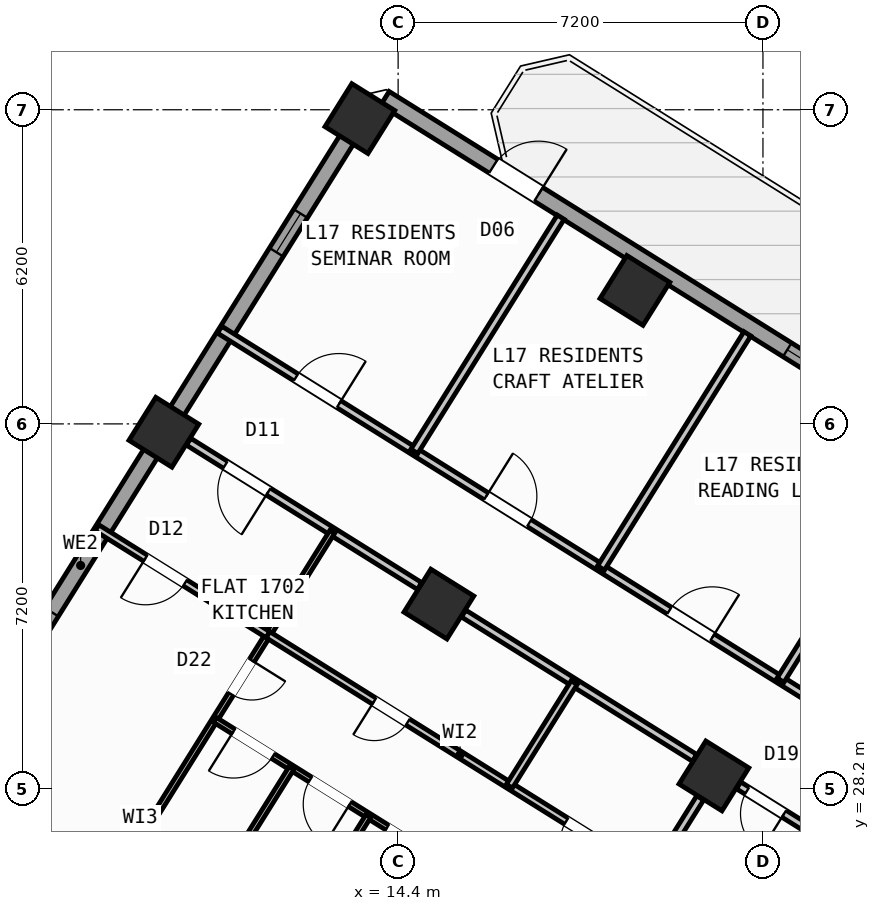
"""IFC4 building model, lengths in metres.
Left out: names, types, materials, properties, quantities, classifications, styles, units other than length and angle.
Written with IfcOpenShell. Run it as: python <this file> out.ifc"""

import sys

from ifc_helpers import new_model, si_unit, direction, frame, frame_2d, origin, origin_2d, place, context, subcontext, project, spatial, rectangle, hollow_rectangle, extrude, source, transform, mapped, element, fill, save


model = new_model("IFC4")
c1 = context("Model", 3, precision=1e-05, world=origin(), true_north=direction((0.0, 1.0)))
c2 = subcontext(c1, "Body", "Model", "MODEL_VIEW")
j1 = project(units=[si_unit("LENGTHUNIT", "METRE"), si_unit("PLANEANGLEUNIT", "RADIAN")], contexts=[c1])
p1 = place(None, origin())
s1 = spatial("IfcSite", under=j1, at=p1, CompositionType="ELEMENT")
p2 = place(p1, origin())
s2 = spatial("IfcBuilding", under=s1, at=p2, CompositionType="ELEMENT")
p3 = place(p2, frame((0.0, 0.0, 67.2)))
s3 = spatial("IfcBuildingStorey", under=s2, at=p3, CompositionType="ELEMENT", Elevation=67.2)
m1 = source(origin(), c2, "Body", "SweptSolid", [
    extrude(hollow_rectangle(XDim=1.0, YDim=1.0, WallThickness=0.04, at=origin_2d()), origin(), (0.0, 0.0, 1.0), 4.5),
])
for number, where, z_axis, x_axis in (
    (1, (20.632, 28.452, 0.0), (0.0, 0.0, 1.0), (-0.848, 0.53, 0.0)),
    (2, (19.073, 38.034, 0.0), (0.0, 0.0, 1.0), (-0.848, 0.53, 0.0)),
    (3, (15.205, 31.844, 0.0), (0.0, 0.0, 1.0), (-0.848, 0.53, 0.0)),
    (4, (13.646, 41.426, 0.0), (0.0, 0.0, 1.0), (-0.848, 0.53, 0.0)),
    (5, (9.777, 35.235, 0.0), (0.0, 0.0, 1.0), (-0.848, 0.53, 0.0)),
):
    element("IfcColumn", number, at=place(p3, frame(where, z_axis=z_axis, x_axis=x_axis)), inside=s3, PredefinedType="COLUMN", context=c2, shape_type="MappedRepresentation", body=[
        mapped(m1, transform((0.0, 0.0, 0.0), scale=1.0)),
    ])
p4 = place(p3, frame((2.415, 23.452, 0.0), z_axis=(0.0, 0.0, 1.0), x_axis=(0.52991049553, 0.848053575387, 0.0)))
e6 = element("IfcWall", 6, at=p4, inside=s3, PredefinedType="STANDARD", context=c2, shape_type="SweptSolid", body=[
    extrude(rectangle(XDim=21.587, YDim=0.32, at=frame_2d((10.794, 0.0))), origin(), (0.0, 0.0, 1.0), 2.395),
])
p5 = place(p4, frame((1.788, 0.0, 1.0)))
e7 = element("IfcOpeningElement", 7, at=p5, cuts=e6, PredefinedType="OPENING", context=c2, shape_type="SweptSolid", body=[
    extrude(rectangle(XDim=0.9, YDim=1.25, at=frame_2d((0.45, 0.625))), frame((0.0, 0.17, 0.0), z_axis=(0.0, -1.0, 0.0), x_axis=(1.0, 0.0, 0.0)), (0.0, 0.0, 1.0), 0.34),
])
p6 = place(p4, frame((4.125, 0.0, 1.0)))
e8 = element("IfcOpeningElement", 8, at=p6, cuts=e6, PredefinedType="OPENING", context=c2, shape_type="SweptSolid", body=[
    extrude(rectangle(XDim=0.9, YDim=1.25, at=frame_2d((0.45, 0.625))), frame((0.0, 0.17, 0.0), z_axis=(0.0, -1.0, 0.0), x_axis=(1.0, 0.0, 0.0)), (0.0, 0.0, 1.0), 0.34),
])
p7 = place(p4, frame((8.809, 0.0, 1.0)))
e9 = element("IfcOpeningElement", 9, at=p7, cuts=e6, PredefinedType="OPENING", context=c2, shape_type="SweptSolid", body=[
    extrude(rectangle(XDim=0.9, YDim=1.25, at=frame_2d((0.45, 0.625))), frame((0.0, 0.17, 0.0), z_axis=(0.0, -1.0, 0.0), x_axis=(1.0, 0.0, 0.0)), (0.0, 0.0, 1.0), 0.34),
])
p8 = place(p4, frame((18.084, 0.0, 1.0)))
e10 = element("IfcOpeningElement", 10, at=p8, cuts=e6, PredefinedType="OPENING", context=c2, shape_type="SweptSolid", body=[
    extrude(rectangle(XDim=0.9, YDim=1.25, at=frame_2d((0.45, 0.625))), frame((0.0, 0.17, 0.0), z_axis=(0.0, -1.0, 0.0), x_axis=(1.0, 0.0, 0.0)), (0.0, 0.0, 1.0), 0.34),
])
p9 = place(p3, frame((14.138, 41.825, 0.0), z_axis=(0.0, 0.0, 1.0), x_axis=(0.848046498049, -0.529921821731, 0.0)))
e11 = element("IfcWall", 11, at=p9, inside=s3, PredefinedType="STANDARD", context=c2, shape_type="SweptSolid", body=[
    extrude(rectangle(XDim=31.588, YDim=0.32, at=frame_2d((15.794, 0.0))), origin(), (0.0, 0.0, 1.0), 4.22),
])
p10 = place(p9, frame((2.526, 0.0, 0.0)))
e12 = element("IfcOpeningElement", 12, at=p10, cuts=e11, PredefinedType="OPENING", context=c2, shape_type="SweptSolid", body=[
    extrude(rectangle(XDim=1.05, YDim=2.15, at=frame_2d((0.525, 1.075))), frame((0.0, 0.17, 0.0), z_axis=(0.0, -1.0, 0.0), x_axis=(1.0, 0.0, 0.0)), (0.0, 0.0, 1.0), 0.34),
])
p11 = place(p9, frame((9.364, 0.0, 0.95)))
e13 = element("IfcOpeningElement", 13, at=p11, cuts=e11, PredefinedType="OPENING", context=c2, shape_type="SweptSolid", body=[
    extrude(rectangle(XDim=1.2, YDim=1.4, at=frame_2d((0.6, 0.7))), frame((0.0, 0.17, 0.0), z_axis=(0.0, -1.0, 0.0), x_axis=(1.0, 0.0, 0.0)), (0.0, 0.0, 1.0), 0.34),
])
p12 = place(p9, frame((14.636, 0.0, 1.0)))
e14 = element("IfcOpeningElement", 14, at=p12, cuts=e11, PredefinedType="OPENING", context=c2, shape_type="SweptSolid", body=[
    extrude(rectangle(XDim=0.9, YDim=1.25, at=frame_2d((0.45, 0.625))), frame((0.0, 0.17, 0.0), z_axis=(0.0, -1.0, 0.0), x_axis=(1.0, 0.0, 0.0)), (0.0, 0.0, 1.0), 0.34),
])
p13 = place(p9, frame((22.306, 0.0, 0.85)))
e15 = element("IfcOpeningElement", 15, at=p13, cuts=e11, PredefinedType="OPENING", context=c2, shape_type="SweptSolid", body=[
    extrude(rectangle(XDim=1.5, YDim=1.5, at=frame_2d((0.75, 0.75))), frame((0.0, 0.17, 0.0), z_axis=(0.0, -1.0, 0.0), x_axis=(1.0, 0.0, 0.0)), (0.0, 0.0, 1.0), 0.34),
])
p14 = place(p9, frame((26.981, 0.0, 0.85)))
e16 = element("IfcOpeningElement", 16, at=p14, cuts=e11, PredefinedType="OPENING", context=c2, shape_type="SweptSolid", body=[
    extrude(rectangle(XDim=1.5, YDim=1.5, at=frame_2d((0.75, 0.75))), frame((0.0, 0.17, 0.0), z_axis=(0.0, -1.0, 0.0), x_axis=(1.0, 0.0, 0.0)), (0.0, 0.0, 1.0), 0.34),
])
p15 = place(p3, frame((25.065, 28.394, 0.0), z_axis=(0.0, 0.0, 1.0), x_axis=(-0.848048310262, 0.529918921593, 0.0)))
e17 = element("IfcWall", 17, at=p15, inside=s3, PredefinedType="PARTITIONING", context=c2, shape_type="SweptSolid", body=[
    extrude(rectangle(XDim=16.73, YDim=0.16, at=frame_2d((8.365, 0.0))), origin(), (0.0, 0.0, 1.0), 4.21),
])
p16 = place(p15, frame((1.338, 0.0, 0.0)))
e18 = element("IfcOpeningElement", 18, at=p16, cuts=e17, PredefinedType="OPENING", context=c2, shape_type="SweptSolid", body=[
    extrude(rectangle(XDim=1.0, YDim=2.1, at=frame_2d((0.5, 1.05))), frame((0.0, 0.09, 0.0), z_axis=(0.0, -1.0, 0.0), x_axis=(1.0, 0.0, 0.0)), (0.0, 0.0, 1.0), 0.18),
])
p17 = place(p15, frame((5.265, 0.0, 0.0)))
e19 = element("IfcOpeningElement", 19, at=p17, cuts=e17, PredefinedType="OPENING", context=c2, shape_type="SweptSolid", body=[
    extrude(rectangle(XDim=1.0, YDim=2.1, at=frame_2d((0.5, 1.05))), frame((0.0, 0.09, 0.0), z_axis=(0.0, -1.0, 0.0), x_axis=(1.0, 0.0, 0.0)), (0.0, 0.0, 1.0), 0.18),
])
p18 = place(p15, frame((9.526, 0.0, 0.0)))
e20 = element("IfcOpeningElement", 20, at=p18, cuts=e17, PredefinedType="OPENING", context=c2, shape_type="SweptSolid", body=[
    extrude(rectangle(XDim=1.0, YDim=2.1, at=frame_2d((0.5, 1.05))), frame((0.0, 0.09, 0.0), z_axis=(0.0, -1.0, 0.0), x_axis=(1.0, 0.0, 0.0)), (0.0, 0.0, 1.0), 0.18),
])
p19 = place(p15, frame((13.954, 0.0, 0.0)))
e21 = element("IfcOpeningElement", 21, at=p19, cuts=e17, PredefinedType="OPENING", context=c2, shape_type="SweptSolid", body=[
    extrude(rectangle(XDim=1.0, YDim=2.1, at=frame_2d((0.5, 1.05))), frame((0.0, 0.09, 0.0), z_axis=(0.0, -1.0, 0.0), x_axis=(1.0, 0.0, 0.0)), (0.0, 0.0, 1.0), 0.18),
])
p20 = place(p3, frame((23.899, 26.529, 0.0), z_axis=(0.0, 0.0, 1.0), x_axis=(-0.848061058944, 0.529898518871, 0.0)))
e22 = element("IfcWall", 22, at=p20, inside=s3, PredefinedType="PARTITIONING", context=c2, shape_type="SweptSolid", body=[
    extrude(rectangle(XDim=3.278, YDim=0.16, at=frame_2d((1.639, 0.0))), origin(), (0.0, 0.0, 1.0), 3.595),
])
p21 = place(p20, frame((2.22, 0.0, 0.0)))
e23 = element("IfcOpeningElement", 23, at=p21, cuts=e22, PredefinedType="OPENING", context=c2, shape_type="SweptSolid", body=[
    extrude(rectangle(XDim=0.86, YDim=2.05, at=frame_2d((0.43, 1.025))), frame((0.0, 0.09, 0.0), z_axis=(0.0, -1.0, 0.0), x_axis=(1.0, 0.0, 0.0)), (0.0, 0.0, 1.0), 0.18),
])
p22 = place(p3, frame((20.251, 28.808, 0.0), z_axis=(0.0, 0.0, 1.0), x_axis=(-0.848044224181, 0.529925460639, 0.0)))
e24 = element("IfcWall", 24, at=p22, inside=s3, PredefinedType="PARTITIONING", context=c2, shape_type="SweptSolid", body=[
    extrude(rectangle(XDim=5.376, YDim=0.16, at=frame_2d((2.688, 0.0))), origin(), (0.0, 0.0, 1.0), 3.595),
])
p23 = place(p3, frame((14.823, 32.2, 0.0), z_axis=(0.0, 0.0, 1.0), x_axis=(-0.848044224181, 0.529925460639, 0.0)))
e25 = element("IfcWall", 25, at=p23, inside=s3, PredefinedType="PARTITIONING", context=c2, shape_type="SweptSolid", body=[
    extrude(rectangle(XDim=5.376, YDim=0.16, at=frame_2d((2.688, 0.0))), origin(), (0.0, 0.0, 1.0), 3.595),
])
p24 = place(p23, frame((3.518, 0.0, 0.0)))
e26 = element("IfcOpeningElement", 26, at=p24, cuts=e25, PredefinedType="OPENING", context=c2, shape_type="SweptSolid", body=[
    extrude(rectangle(XDim=1.0, YDim=2.1, at=frame_2d((0.5, 1.05))), frame((0.0, 0.09, 0.0), z_axis=(0.0, -1.0, 0.0), x_axis=(1.0, 0.0, 0.0)), (0.0, 0.0, 1.0), 0.18),
])
p25 = place(p3, frame((20.361, 28.018, 0.0), z_axis=(0.0, 0.0, 1.0), x_axis=(-0.529915015264, -0.848050751193, 0.0)))
e27 = element("IfcWall", 27, at=p25, inside=s3, PredefinedType="PARTITIONING", context=c2, shape_type="SweptSolid", body=[
    extrude(rectangle(XDim=6.276, YDim=0.16, at=frame_2d((3.138, 0.0))), origin(), (0.0, 0.0, 1.0), 2.395),
])
p26 = place(p3, frame((22.585, 27.35, 0.0), z_axis=(0.0, 0.0, 1.0), x_axis=(-0.529977067289, -0.848011974059, 0.0)))
e28 = element("IfcWall", 28, at=p26, inside=s3, PredefinedType="PLUMBINGWALL", context=c2, shape_type="SweptSolid", body=[
    extrude(rectangle(XDim=3.01, YDim=0.14, at=frame_2d((1.505, 0.0))), origin(), (0.0, 0.0, 1.0), 3.865),
])
p27 = place(p26, frame((1.115, 0.0, 0.0)))
e29 = element("IfcOpeningElement", 29, at=p27, cuts=e28, PredefinedType="OPENING", context=c2, shape_type="SweptSolid", body=[
    extrude(rectangle(XDim=0.78, YDim=2.05, at=frame_2d((0.39, 1.025))), frame((0.0, 0.08, 0.0), z_axis=(0.0, -1.0, 0.0), x_axis=(1.0, 0.0, 0.0)), (0.0, 0.0, 1.0), 0.16),
])
p28 = place(p3, frame((13.104, 33.274, 0.0), z_axis=(0.0, 0.0, 1.0), x_axis=(-0.529916182913, -0.848050021571, 0.0)))
e30 = element("IfcWall", 30, at=p28, inside=s3, PredefinedType="PARTITIONING", context=c2, shape_type="SweptSolid", body=[
    extrude(rectangle(XDim=14.32, YDim=0.11, at=frame_2d((7.16, 0.0))), origin(), (0.0, 0.0, 1.0), 4.21),
])
p29 = place(p28, frame((3.0, 0.0, 0.0)))
e31 = element("IfcOpeningElement", 31, at=p29, cuts=e30, PredefinedType="OPENING", context=c2, shape_type="SweptSolid", body=[
    extrude(rectangle(XDim=0.78, YDim=2.05, at=frame_2d((0.39, 1.025))), frame((0.0, 0.065, 0.0), z_axis=(0.0, -1.0, 0.0), x_axis=(1.0, 0.0, 0.0)), (0.0, 0.0, 1.0), 0.13),
])
p30 = place(p3, frame((11.832, 31.239, 0.0), z_axis=(0.0, 0.0, 1.0), x_axis=(-0.848025873403, 0.529954826413, 0.0)))
e32 = element("IfcWall", 32, at=p30, inside=s3, PredefinedType="PLUMBINGWALL", context=c2, shape_type="SweptSolid", body=[
    extrude(rectangle(XDim=3.98, YDim=0.14, at=frame_2d((1.99, 0.0))), origin(), (0.0, 0.0, 1.0), 4.21),
])
p31 = place(p30, frame((1.93, 0.0, 0.0)))
e33 = element("IfcOpeningElement", 33, at=p31, cuts=e32, PredefinedType="OPENING", context=c2, shape_type="SweptSolid", body=[
    extrude(rectangle(XDim=0.92, YDim=2.08, at=frame_2d((0.46, 1.04))), frame((0.0, 0.08, 0.0), z_axis=(0.0, -1.0, 0.0), x_axis=(1.0, 0.0, 0.0)), (0.0, 0.0, 1.0), 0.16),
])
p32 = place(p3, frame((19.413, 26.501, 0.0), z_axis=(0.0, 0.0, 1.0), x_axis=(-0.848051995289, 0.529913024266, 0.0)))
e34 = element("IfcWall", 34, at=p32, inside=s3, PredefinedType="PLUMBINGWALL", context=c2, shape_type="SweptSolid", body=[
    extrude(rectangle(XDim=8.94, YDim=0.14, at=frame_2d((4.47, 0.0))), origin(), (0.0, 0.0, 1.0), 4.21),
])
p33 = place(p32, frame((5.688, 0.0, 0.0)))
e35 = element("IfcOpeningElement", 35, at=p33, cuts=e34, PredefinedType="OPENING", context=c2, shape_type="SweptSolid", body=[
    extrude(rectangle(XDim=0.78, YDim=2.05, at=frame_2d((0.39, 1.025))), frame((0.0, 0.08, 0.0), z_axis=(0.0, -1.0, 0.0), x_axis=(1.0, 0.0, 0.0)), (0.0, 0.0, 1.0), 0.16),
])
p34 = place(p32, frame((1.218, 0.0, 0.0)))
e36 = element("IfcOpeningElement", 36, at=p34, cuts=e34, PredefinedType="OPENING", context=c2, shape_type="SweptSolid", body=[
    extrude(rectangle(XDim=0.78, YDim=2.05, at=frame_2d((0.39, 1.025))), frame((0.0, 0.08, 0.0), z_axis=(0.0, -1.0, 0.0), x_axis=(1.0, 0.0, 0.0)), (0.0, 0.0, 1.0), 0.16),
])
p35 = place(p3, frame((17.874, 30.294, 0.0), z_axis=(0.0, 0.0, 1.0), x_axis=(-0.52988967038, -0.848066587731, 0.0)))
e37 = element("IfcWall", 37, at=p35, inside=s3, PredefinedType="PLUMBINGWALL", context=c2, shape_type="SweptSolid", body=[
    extrude(rectangle(XDim=2.41, YDim=0.14, at=frame_2d((1.205, 0.0))), origin(), (0.0, 0.0, 1.0), 4.21),
])
p36 = place(p3, frame((18.364, 24.823, 0.0), z_axis=(0.0, 0.0, 1.0), x_axis=(-0.848056599187, 0.529905656296, 0.0)))
e38 = element("IfcWall", 38, at=p36, inside=s3, PredefinedType="PARTITIONING", context=c2, shape_type="SweptSolid", body=[
    extrude(rectangle(XDim=8.94, YDim=0.11, at=frame_2d((4.47, 0.0))), origin(), (0.0, 0.0, 1.0), 4.21),
])
p37 = place(p36, frame((0.434, 0.0, 0.0)))
e39 = element("IfcOpeningElement", 39, at=p37, cuts=e38, PredefinedType="OPENING", context=c2, shape_type="SweptSolid", body=[
    extrude(rectangle(XDim=0.92, YDim=2.08, at=frame_2d((0.46, 1.04))), frame((0.0, 0.065, 0.0), z_axis=(0.0, -1.0, 0.0), x_axis=(1.0, 0.0, 0.0)), (0.0, 0.0, 1.0), 0.13),
])
p38 = place(p36, frame((2.222, 0.0, 0.0)))
e40 = element("IfcOpeningElement", 40, at=p38, cuts=e38, PredefinedType="OPENING", context=c2, shape_type="SweptSolid", body=[
    extrude(rectangle(XDim=0.92, YDim=2.08, at=frame_2d((0.46, 1.04))), frame((0.0, 0.065, 0.0), z_axis=(0.0, -1.0, 0.0), x_axis=(1.0, 0.0, 0.0)), (0.0, 0.0, 1.0), 0.13),
])
p39 = place(p36, frame((4.01, 0.0, 0.0)))
e41 = element("IfcOpeningElement", 41, at=p39, cuts=e38, PredefinedType="OPENING", context=c2, shape_type="SweptSolid", body=[
    extrude(rectangle(XDim=0.92, YDim=2.08, at=frame_2d((0.46, 1.04))), frame((0.0, 0.065, 0.0), z_axis=(0.0, -1.0, 0.0), x_axis=(1.0, 0.0, 0.0)), (0.0, 0.0, 1.0), 0.13),
])
p40 = place(p36, frame((5.798, 0.0, 0.0)))
e42 = element("IfcOpeningElement", 42, at=p40, cuts=e38, PredefinedType="OPENING", context=c2, shape_type="SweptSolid", body=[
    extrude(rectangle(XDim=0.92, YDim=2.08, at=frame_2d((0.46, 1.04))), frame((0.0, 0.065, 0.0), z_axis=(0.0, -1.0, 0.0), x_axis=(1.0, 0.0, 0.0)), (0.0, 0.0, 1.0), 0.13),
])
p41 = place(p36, frame((7.586, 0.0, 0.0)))
e43 = element("IfcOpeningElement", 43, at=p41, cuts=e38, PredefinedType="OPENING", context=c2, shape_type="SweptSolid", body=[
    extrude(rectangle(XDim=0.92, YDim=2.08, at=frame_2d((0.46, 1.04))), frame((0.0, 0.065, 0.0), z_axis=(0.0, -1.0, 0.0), x_axis=(1.0, 0.0, 0.0)), (0.0, 0.0, 1.0), 0.13),
])
p42 = place(p3, frame((13.815, 27.665, 0.0), z_axis=(0.0, 0.0, 1.0), x_axis=(-0.529910626741, -0.8480534934, 0.0)))
e44 = element("IfcWall", 44, at=p42, inside=s3, PredefinedType="PARTITIONING", context=c2, shape_type="SweptSolid", body=[
    extrude(rectangle(XDim=9.94, YDim=0.11, at=frame_2d((4.97, 0.0))), origin(), (0.0, 0.0, 1.0), 4.21),
])
p43 = place(p3, frame((12.299, 28.613, 0.0), z_axis=(0.0, 0.0, 1.0), x_axis=(-0.529928290772, -0.848042455682, 0.0)))
e45 = element("IfcWall", 45, at=p43, inside=s3, PredefinedType="PARTITIONING", context=c2, shape_type="SweptSolid", body=[
    extrude(rectangle(XDim=9.94, YDim=0.11, at=frame_2d((4.97, 0.0))), origin(), (0.0, 0.0, 1.0), 4.21),
])
p44 = place(p3, frame((24.326, 34.148, 0.0), z_axis=(0.0, 0.0, 1.0), x_axis=(-0.529915808518, -0.848050255517, 0.0)))
e46 = element("IfcWall", 46, at=p44, inside=s3, PredefinedType="PARTITIONING", context=c2, shape_type="SweptSolid", body=[
    extrude(rectangle(XDim=4.488, YDim=0.16, at=frame_2d((2.244, 0.0))), origin(), (0.0, 0.0, 1.0), 2.395),
])
for number, where, z_axis, x_axis in (
    (47, (21.292, 37.178, 0.0), (0.0, 0.0, 1.0), (-0.53, -0.848, 0.0)),
    (48, (17.608, 39.48, 0.0), (0.0, 0.0, 1.0), (-0.53, -0.848, 0.0)),
):
    element("IfcWall", number, at=place(p3, frame(where, z_axis=z_axis, x_axis=x_axis)), inside=s3, PredefinedType="PARTITIONING", context=c2, shape_type="SweptSolid", body=[
        extrude(rectangle(XDim=5.45, YDim=0.16, at=frame_2d((2.725, 0.0))), origin(), (0.0, 0.0, 1.0), 3.865),
    ])
m2 = source(origin(), c2, "Body", "SweptSolid", [
    extrude(rectangle(XDim=1.05, YDim=2.15, at=frame_2d((0.525, 1.075))), frame((0.0, 0.025, 0.0), z_axis=(0.0, -1.0, 0.0), x_axis=(1.0, 0.0, 0.0)), (0.0, 0.0, 1.0), 0.05),
])
p45 = place(p10, origin())
e49 = element("IfcDoor", 49, at=p45, inside=s3, OperationType="SINGLE_SWING_RIGHT", PredefinedType="DOOR", context=c2, shape_type="MappedRepresentation", body=[
    mapped(m2, transform((0.0, 0.0, 0.0), scale=1.0)),
])
fill(e12, e49)
m3 = source(origin(), c2, "Body", "SweptSolid", [
    extrude(rectangle(XDim=0.9, YDim=1.25, at=frame_2d((0.45, 0.625))), frame((0.0, 0.03, 0.0), z_axis=(0.0, -1.0, 0.0), x_axis=(1.0, 0.0, 0.0)), (0.0, 0.0, 1.0), 0.06),
])
p46 = place(p7, origin())
e50 = element("IfcWindow", 50, at=p46, inside=s3, PartitioningType="SINGLE_PANEL", PredefinedType="WINDOW", context=c2, shape_type="MappedRepresentation", body=[
    mapped(m3, transform((0.0, 0.0, 0.0), scale=1.0)),
])
fill(e9, e50)
p47 = place(p8, origin())
e51 = element("IfcWindow", 51, at=p47, inside=s3, PartitioningType="SINGLE_PANEL", PredefinedType="WINDOW", context=c2, shape_type="MappedRepresentation", body=[
    mapped(m3, transform((0.0, 0.0, 0.0), scale=1.0)),
])
fill(e10, e51)
m4 = source(origin(), c2, "Body", "SweptSolid", [
    extrude(rectangle(XDim=1.2, YDim=1.4, at=frame_2d((0.6, 0.7))), frame((0.0, 0.03, 0.0), z_axis=(0.0, -1.0, 0.0), x_axis=(1.0, 0.0, 0.0)), (0.0, 0.0, 1.0), 0.06),
])
p48 = place(p11, origin())
e52 = element("IfcWindow", 52, at=p48, inside=s3, PartitioningType="SINGLE_PANEL", PredefinedType="WINDOW", context=c2, shape_type="MappedRepresentation", body=[
    mapped(m4, transform((0.0, 0.0, 0.0), scale=1.0)),
])
fill(e13, e52)
m5 = source(origin(), c2, "Body", "SweptSolid", [
    extrude(rectangle(XDim=0.86, YDim=2.05, at=frame_2d((0.43, 1.025))), frame((0.0, 0.025, 0.0), z_axis=(0.0, -1.0, 0.0), x_axis=(1.0, 0.0, 0.0)), (0.0, 0.0, 1.0), 0.05),
])
p49 = place(p21, origin())
e53 = element("IfcDoor", 53, at=p49, inside=s3, OperationType="SINGLE_SWING_LEFT", PredefinedType="DOOR", context=c2, shape_type="MappedRepresentation", body=[
    mapped(m5, transform((0.0, 0.0, 0.0), scale=1.0)),
])
fill(e23, e53)
m6 = source(origin(), c2, "Body", "SweptSolid", [
    extrude(rectangle(XDim=1.0, YDim=2.1, at=frame_2d((0.5, 1.05))), frame((0.0, 0.025, 0.0), z_axis=(0.0, -1.0, 0.0), x_axis=(1.0, 0.0, 0.0)), (0.0, 0.0, 1.0), 0.05),
])
p50 = place(p24, origin())
e54 = element("IfcDoor", 54, at=p50, inside=s3, OperationType="SINGLE_SWING_LEFT", PredefinedType="DOOR", context=c2, shape_type="MappedRepresentation", body=[
    mapped(m6, transform((0.0, 0.0, 0.0), scale=1.0)),
])
fill(e26, e54)
m7 = source(origin(), c2, "Body", "SweptSolid", [
    extrude(rectangle(XDim=0.92, YDim=2.08, at=frame_2d((0.46, 1.04))), frame((0.0, 0.025, 0.0), z_axis=(0.0, -1.0, 0.0), x_axis=(1.0, 0.0, 0.0)), (0.0, 0.0, 1.0), 0.05),
])
p51 = place(p31, origin())
e55 = element("IfcDoor", 55, at=p51, inside=s3, OperationType="SINGLE_SWING_RIGHT", PredefinedType="DOOR", context=c2, shape_type="MappedRepresentation", body=[
    mapped(m7, transform((0.0, 0.0, 0.0), scale=1.0)),
])
fill(e33, e55)
m8 = source(origin(), c2, "Body", "SweptSolid", [
    extrude(rectangle(XDim=0.78, YDim=2.05, at=frame_2d((0.39, 1.025))), frame((0.0, 0.025, 0.0), z_axis=(0.0, -1.0, 0.0), x_axis=(1.0, 0.0, 0.0)), (0.0, 0.0, 1.0), 0.05),
])
p52 = place(p29, origin())
e56 = element("IfcDoor", 56, at=p52, inside=s3, OperationType="SINGLE_SWING_LEFT", PredefinedType="DOOR", context=c2, shape_type="MappedRepresentation", body=[
    mapped(m8, transform((0.0, 0.0, 0.0), scale=1.0)),
])
fill(e31, e56)
p53 = place(p33, origin())
e57 = element("IfcDoor", 57, at=p53, inside=s3, OperationType="SINGLE_SWING_RIGHT", PredefinedType="DOOR", context=c2, shape_type="MappedRepresentation", body=[
    mapped(m8, transform((0.0, 0.0, 0.0), scale=1.0)),
])
fill(e35, e57)
p54 = place(p34, origin())
e58 = element("IfcDoor", 58, at=p54, inside=s3, OperationType="SINGLE_SWING_LEFT", PredefinedType="DOOR", context=c2, shape_type="MappedRepresentation", body=[
    mapped(m8, transform((0.0, 0.0, 0.0), scale=1.0)),
])
fill(e36, e58)
p55 = place(p39, origin())
e59 = element("IfcDoor", 59, at=p55, inside=s3, OperationType="SINGLE_SWING_RIGHT", PredefinedType="DOOR", context=c2, shape_type="MappedRepresentation", body=[
    mapped(m7, transform((0.0, 0.0, 0.0), scale=1.0)),
])
fill(e41, e59)
p56 = place(p40, origin())
e60 = element("IfcDoor", 60, at=p56, inside=s3, OperationType="SINGLE_SWING_LEFT", PredefinedType="DOOR", context=c2, shape_type="MappedRepresentation", body=[
    mapped(m7, transform((0.0, 0.0, 0.0), scale=1.0)),
])
fill(e42, e60)
p57 = place(p41, origin())
e61 = element("IfcDoor", 61, at=p57, inside=s3, OperationType="SINGLE_SWING_RIGHT", PredefinedType="DOOR", context=c2, shape_type="MappedRepresentation", body=[
    mapped(m7, transform((0.0, 0.0, 0.0), scale=1.0)),
])
fill(e43, e61)
p58 = place(p17, frame((1.0, 0.0, 0.0), z_axis=(0.0, 0.0, 1.0), x_axis=(-1.0, 0.0, 0.0)))
e62 = element("IfcDoor", 62, at=p58, inside=s3, OperationType="SINGLE_SWING_RIGHT", PredefinedType="DOOR", context=c2, shape_type="MappedRepresentation", body=[
    mapped(m6, transform((0.0, 0.0, 0.0), scale=1.0)),
])
fill(e19, e62)
p59 = place(p18, frame((1.0, 0.0, 0.0), z_axis=(0.0, 0.0, 1.0), x_axis=(-1.0, 0.0, 0.0)))
e63 = element("IfcDoor", 63, at=p59, inside=s3, OperationType="SINGLE_SWING_LEFT", PredefinedType="DOOR", context=c2, shape_type="MappedRepresentation", body=[
    mapped(m6, transform((0.0, 0.0, 0.0), scale=1.0)),
])
fill(e20, e63)
p60 = place(p19, frame((1.0, 0.0, 0.0), z_axis=(0.0, 0.0, 1.0), x_axis=(-1.0, 0.0, 0.0)))
e64 = element("IfcDoor", 64, at=p60, inside=s3, OperationType="SINGLE_SWING_RIGHT", PredefinedType="DOOR", context=c2, shape_type="MappedRepresentation", body=[
    mapped(m6, transform((0.0, 0.0, 0.0), scale=1.0)),
])
fill(e21, e64)
save(model, sys.argv[1])
